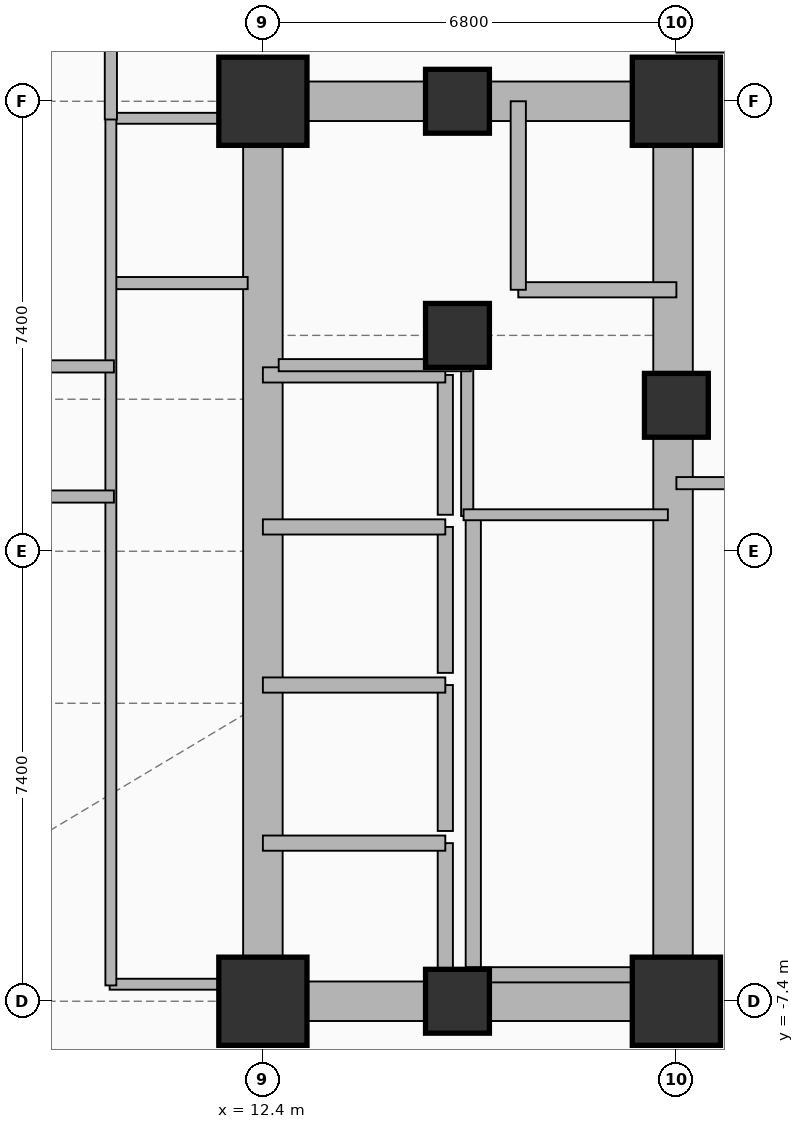
"""IFC4 building model, lengths in metres.
Left out: names, types, materials, properties, quantities, classifications, styles, units other than length and angle.
Written with IfcOpenShell. Run it as: python <this file> out.ifc"""

import sys

from ifc_helpers import new_model, si_unit, direction, frame, frame_2d, origin, origin_2d, place, context, subcontext, project, spatial, rectangle, extrude, element, fill, save


model = new_model("IFC4")
c1 = context("Model", 3, precision=1e-05, world=origin(), true_north=direction((0.0, 1.0)))
c2 = subcontext(c1, "Body", "Model", "MODEL_VIEW")
j1 = project(units=[si_unit("LENGTHUNIT", "METRE"), si_unit("PLANEANGLEUNIT", "RADIAN")], contexts=[c1])
p1 = place(None, origin())
s1 = spatial("IfcSite", under=j1, at=p1, CompositionType="ELEMENT")
p2 = place(p1, origin())
s2 = spatial("IfcBuilding", under=s1, at=p2, CompositionType="ELEMENT")
p3 = place(p2, frame((0.0, 0.0, 80.6)))
s3 = spatial("IfcBuildingStorey", under=s2, at=p3, CompositionType="ELEMENT", Elevation=80.6)
p4 = place(p3, frame((12.4, -7.4, 0.0), z_axis=(0.0, 0.0, 1.0), x_axis=(1.0, 0.0, 0.0)))
e1 = element("IfcColumn", 1, at=p4, inside=s3, PredefinedType="COLUMN", context=c2, shape_type="SweptSolid", body=[
    extrude(rectangle(XDim=1.45, YDim=1.45, at=origin_2d()), origin(), (0.0, 0.0, 1.0), 5.2),
])
p5 = place(p3, frame((15.6, 3.55, 0.0), z_axis=(0.0, 0.0, 1.0), x_axis=(1.0, 0.0, 0.0)))
e2 = element("IfcColumn", 2, at=p5, inside=s3, PredefinedType="COLUMN", context=c2, shape_type="SweptSolid", body=[
    extrude(rectangle(XDim=1.05, YDim=1.05, at=origin_2d()), origin(), (0.0, 0.0, 1.0), 5.2),
])
p6 = place(p3, frame((12.4, 7.4, 0.0), z_axis=(0.0, 0.0, 1.0), x_axis=(1.0, 0.0, 0.0)))
e3 = element("IfcColumn", 3, at=p6, inside=s3, PredefinedType="COLUMN", context=c2, shape_type="SweptSolid", body=[
    extrude(rectangle(XDim=1.45, YDim=1.45, at=origin_2d()), origin(), (0.0, 0.0, 1.0), 5.2),
])
for number, where, z_axis, x_axis in (
    (4, (15.6, -7.4, 0.0), (0.0, 0.0, 1.0), (1.0, 0.0, 0.0)),
    (5, (15.6, 7.4, 0.0), (0.0, 0.0, 1.0), (1.0, 0.0, 0.0)),
):
    element("IfcColumn", number, at=place(p3, frame(where, z_axis=z_axis, x_axis=x_axis)), inside=s3, PredefinedType="COLUMN", context=c2, shape_type="SweptSolid", body=[
        extrude(rectangle(XDim=1.05, YDim=1.05, at=origin_2d()), origin(), (0.0, 0.0, 1.0), 5.2),
    ])
p7 = place(p3, frame((19.2, -7.4, 0.0), z_axis=(0.0, 0.0, 1.0), x_axis=(1.0, 0.0, 0.0)))
e6 = element("IfcColumn", 6, at=p7, inside=s3, PredefinedType="COLUMN", context=c2, shape_type="SweptSolid", body=[
    extrude(rectangle(XDim=1.45, YDim=1.45, at=origin_2d()), origin(), (0.0, 0.0, 1.0), 5.2),
])
p8 = place(p3, frame((19.2, 2.4, 0.0), z_axis=(0.0, 0.0, 1.0), x_axis=(1.0, 0.0, 0.0)))
e7 = element("IfcColumn", 7, at=p8, inside=s3, PredefinedType="COLUMN", context=c2, shape_type="SweptSolid", body=[
    extrude(rectangle(XDim=1.05, YDim=1.05, at=origin_2d()), origin(), (0.0, 0.0, 1.0), 5.2),
])
p9 = place(p3, frame((19.2, 7.4, 0.0), z_axis=(0.0, 0.0, 1.0), x_axis=(1.0, 0.0, 0.0)))
e8 = element("IfcColumn", 8, at=p9, inside=s3, PredefinedType="COLUMN", context=c2, shape_type="SweptSolid", body=[
    extrude(rectangle(XDim=1.45, YDim=1.45, at=origin_2d()), origin(), (0.0, 0.0, 1.0), 5.2),
])
for number, where, z_axis, x_axis in (
    (9, (12.075, -7.4, 0.0), (0.0, 0.0, 1.0), (1.0, 0.0, 0.0)),
    (10, (12.075, 7.4, 0.0), (0.0, 0.0, 1.0), (1.0, 0.0, 0.0)),
):
    element("IfcWall", number, at=place(p3, frame(where, z_axis=z_axis, x_axis=x_axis)), inside=s3, PredefinedType="SHEAR", context=c2, shape_type="SweptSolid", body=[
        extrude(rectangle(XDim=7.45, YDim=0.65, at=frame_2d((3.725, 0.0))), origin(), (0.0, 0.0, 1.0), 4.8),
    ])
p10 = place(p3, frame((12.4, -7.4, 0.0), z_axis=(0.0, 0.0, 1.0), x_axis=(0.0, 1.0, 0.0)))
e11 = element("IfcWall", 11, at=p10, inside=s3, PredefinedType="SHEAR", context=c2, shape_type="SweptSolid", body=[
    extrude(rectangle(XDim=14.8, YDim=0.65, at=frame_2d((7.4, 0.0))), origin(), (0.0, 0.0, 1.0), 4.8),
])
p11 = place(p10, frame((0.85, 0.0, 0.0)))
e12 = element("IfcOpeningElement", 12, at=p11, cuts=e11, PredefinedType="OPENING", context=c2, shape_type="SweptSolid", body=[
    extrude(rectangle(XDim=1.1, YDim=2.05, at=frame_2d((0.55, 1.025))), frame((0.0, 0.335, 0.0), z_axis=(0.0, -1.0, 0.0), x_axis=(1.0, 0.0, 0.0)), (0.0, 0.0, 1.0), 0.67),
])
p12 = place(p10, frame((10.53, 0.0, 0.0)))
e13 = element("IfcOpeningElement", 13, at=p12, cuts=e11, PredefinedType="OPENING", context=c2, shape_type="SweptSolid", body=[
    extrude(rectangle(XDim=1.1, YDim=2.05, at=frame_2d((0.55, 1.025))), frame((0.0, 0.335, 0.0), z_axis=(0.0, -1.0, 0.0), x_axis=(1.0, 0.0, 0.0)), (0.0, 0.0, 1.0), 0.67),
])
p13 = place(p3, frame((19.145, -7.4, 0.0), z_axis=(0.0, 0.0, 1.0), x_axis=(0.0, 1.0, 0.0)))
e14 = element("IfcWall", 14, at=p13, inside=s3, PredefinedType="SHEAR", context=c2, shape_type="SweptSolid", body=[
    extrude(rectangle(XDim=14.8, YDim=0.65, at=frame_2d((7.4, 0.0))), origin(), (0.0, 0.0, 1.0), 4.8),
])
p14 = place(p13, frame((10.6, 0.0, 0.0)))
e15 = element("IfcOpeningElement", 15, at=p14, cuts=e14, PredefinedType="OPENING", context=c2, shape_type="SweptSolid", body=[
    extrude(rectangle(XDim=0.9, YDim=2.05, at=frame_2d((0.45, 1.025))), frame((0.0, 0.335, 0.0), z_axis=(0.0, -1.0, 0.0), x_axis=(1.0, 0.0, 0.0)), (0.0, 0.0, 1.0), 0.67),
])
p15 = place(p3, frame((15.86, -7.085, 0.0), z_axis=(0.0, 0.0, 1.0), x_axis=(0.0, 1.0, 0.0)))
e16 = element("IfcWall", 16, at=p15, inside=s3, PredefinedType="SOLIDWALL", context=c2, shape_type="SweptSolid", body=[
    extrude(rectangle(XDim=7.685, YDim=0.25, at=frame_2d((3.843, 0.0))), origin(), (0.0, 0.0, 1.0), 4.8),
])
p16 = place(p3, frame((15.74, -6.965, 0.0), z_axis=(0.0, 0.0, 1.0), x_axis=(1.0, 0.0, 0.0)))
e17 = element("IfcWall", 17, at=p16, inside=s3, PredefinedType="SOLIDWALL", context=c2, shape_type="SweptSolid", body=[
    extrude(rectangle(XDim=3.46, YDim=0.25, at=frame_2d((1.73, 0.0))), origin(), (0.0, 0.0, 1.0), 4.8),
])
p17 = place(p3, frame((16.6, 4.3, 0.0), z_axis=(0.0, 0.0, 1.0), x_axis=(1.0, 0.0, 0.0)))
e18 = element("IfcWall", 18, at=p17, inside=s3, PredefinedType="SOLIDWALL", context=c2, shape_type="SweptSolid", body=[
    extrude(rectangle(XDim=2.6, YDim=0.25, at=frame_2d((1.3, 0.0))), origin(), (0.0, 0.0, 1.0), 4.8),
])
p18 = place(p3, frame((16.6, 7.4, 0.0), z_axis=(0.0, 0.0, 1.0), x_axis=(0.0, -1.0, 0.0)))
e19 = element("IfcWall", 19, at=p18, inside=s3, PredefinedType="SOLIDWALL", context=c2, shape_type="SweptSolid", body=[
    extrude(rectangle(XDim=3.1, YDim=0.25, at=frame_2d((1.55, 0.0))), origin(), (0.0, 0.0, 1.0), 4.8),
])
p19 = place(p18, frame((0.95, 0.0, 0.0)))
e20 = element("IfcOpeningElement", 20, at=p19, cuts=e19, PredefinedType="OPENING", context=c2, shape_type="SweptSolid", body=[
    extrude(rectangle(XDim=1.2, YDim=2.05, at=frame_2d((0.6, 1.025))), frame((0.0, 0.135, 0.0), z_axis=(0.0, -1.0, 0.0), x_axis=(1.0, 0.0, 0.0)), (0.0, 0.0, 1.0), 0.27),
])
p20 = place(p3, frame((15.4, -7.4, 0.0), z_axis=(0.0, 0.0, 1.0), x_axis=(0.0, 1.0, 0.0)))
e21 = element("IfcWall", 21, at=p20, inside=s3, PredefinedType="SOLIDWALL", context=c2, shape_type="SweptSolid", body=[
    extrude(rectangle(XDim=2.6, YDim=0.25, at=frame_2d((1.3, 0.0))), origin(), (0.0, 0.0, 1.0), 4.8),
])
p21 = place(p3, frame((15.4, -4.8, 0.0), z_axis=(0.0, 0.0, 1.0), x_axis=(-1.0, 0.0, 0.0)))
e22 = element("IfcWall", 22, at=p21, inside=s3, PredefinedType="SOLIDWALL", context=c2, shape_type="SweptSolid", body=[
    extrude(rectangle(XDim=3.0, YDim=0.25, at=frame_2d((1.5, 0.0))), origin(), (0.0, 0.0, 1.0), 4.8),
])
p22 = place(p3, frame((15.4, -4.6, 0.0), z_axis=(0.0, 0.0, 1.0), x_axis=(0.0, 1.0, 0.0)))
e23 = element("IfcWall", 23, at=p22, inside=s3, PredefinedType="SOLIDWALL", context=c2, shape_type="SweptSolid", body=[
    extrude(rectangle(XDim=2.4, YDim=0.25, at=frame_2d((1.2, 0.0))), origin(), (0.0, 0.0, 1.0), 4.8),
])
p23 = place(p3, frame((15.4, -2.2, 0.0), z_axis=(0.0, 0.0, 1.0), x_axis=(-1.0, 0.0, 0.0)))
e24 = element("IfcWall", 24, at=p23, inside=s3, PredefinedType="SOLIDWALL", context=c2, shape_type="SweptSolid", body=[
    extrude(rectangle(XDim=3.0, YDim=0.25, at=frame_2d((1.5, 0.0))), origin(), (0.0, 0.0, 1.0), 4.8),
])
p24 = place(p3, frame((15.4, -2.0, 0.0), z_axis=(0.0, 0.0, 1.0), x_axis=(0.0, 1.0, 0.0)))
e25 = element("IfcWall", 25, at=p24, inside=s3, PredefinedType="SOLIDWALL", context=c2, shape_type="SweptSolid", body=[
    extrude(rectangle(XDim=2.4, YDim=0.25, at=frame_2d((1.2, 0.0))), origin(), (0.0, 0.0, 1.0), 4.8),
])
p25 = place(p3, frame((15.4, 0.4, 0.0), z_axis=(0.0, 0.0, 1.0), x_axis=(-1.0, 0.0, 0.0)))
e26 = element("IfcWall", 26, at=p25, inside=s3, PredefinedType="SOLIDWALL", context=c2, shape_type="SweptSolid", body=[
    extrude(rectangle(XDim=3.0, YDim=0.25, at=frame_2d((1.5, 0.0))), origin(), (0.0, 0.0, 1.0), 4.8),
])
p26 = place(p3, frame((15.4, 0.6, 0.0), z_axis=(0.0, 0.0, 1.0), x_axis=(0.0, 1.0, 0.0)))
e27 = element("IfcWall", 27, at=p26, inside=s3, PredefinedType="SOLIDWALL", context=c2, shape_type="SweptSolid", body=[
    extrude(rectangle(XDim=2.3, YDim=0.25, at=frame_2d((1.15, 0.0))), origin(), (0.0, 0.0, 1.0), 4.8),
])
p27 = place(p3, frame((15.4, 2.9, 0.0), z_axis=(0.0, 0.0, 1.0), x_axis=(-1.0, 0.0, 0.0)))
e28 = element("IfcWall", 28, at=p27, inside=s3, PredefinedType="SOLIDWALL", context=c2, shape_type="SweptSolid", body=[
    extrude(rectangle(XDim=3.0, YDim=0.25, at=frame_2d((1.5, 0.0))), origin(), (0.0, 0.0, 1.0), 4.8),
])
p28 = place(p3, frame((15.76, 0.58, 0.0), z_axis=(0.0, 0.0, 1.0), x_axis=(0.0, 1.0, 0.0)))
e29 = element("IfcWall", 29, at=p28, inside=s3, PredefinedType="PARTITIONING", context=c2, shape_type="SweptSolid", body=[
    extrude(rectangle(XDim=2.52, YDim=0.2, at=frame_2d((1.26, 0.0))), origin(), (0.0, 0.0, 1.0), 4.8),
])
p29 = place(p3, frame((12.66, 3.06, 0.0), z_axis=(0.0, 0.0, 1.0), x_axis=(1.0, 0.0, 0.0)))
e30 = element("IfcWall", 30, at=p29, inside=s3, PredefinedType="PARTITIONING", context=c2, shape_type="SweptSolid", body=[
    extrude(rectangle(XDim=3.16, YDim=0.2, at=frame_2d((1.58, 0.0))), origin(), (0.0, 0.0, 1.0), 4.8),
])
p30 = place(p3, frame((15.7, 0.6, 0.0), z_axis=(0.0, 0.0, 1.0), x_axis=(1.0, 0.0, 0.0)))
e31 = element("IfcWall", 31, at=p30, inside=s3, PredefinedType="PARTITIONING", context=c2, shape_type="SweptSolid", body=[
    extrude(rectangle(XDim=3.36, YDim=0.18, at=frame_2d((1.68, 0.0))), origin(), (0.0, 0.0, 1.0), 4.8),
])
p31 = place(p30, frame((1.155, 0.0, 0.0)))
e32 = element("IfcOpeningElement", 32, at=p31, cuts=e31, PredefinedType="OPENING", context=c2, shape_type="SweptSolid", body=[
    extrude(rectangle(XDim=1.05, YDim=2.05, at=frame_2d((0.525, 1.025))), frame((0.0, 0.1, 0.0), z_axis=(0.0, -1.0, 0.0), x_axis=(1.0, 0.0, 0.0)), (0.0, 0.0, 1.0), 0.2),
])
p32 = place(p3, frame((9.88, 4.41, 0.0), z_axis=(0.0, 0.0, 1.0), x_axis=(1.0, 0.0, 0.0)))
e33 = element("IfcWall", 33, at=p32, inside=s3, PredefinedType="PARTITIONING", context=c2, shape_type="SweptSolid", body=[
    extrude(rectangle(XDim=2.27, YDim=0.2, at=frame_2d((1.135, 0.0))), origin(), (0.0, 0.0, 1.0), 4.8),
])
p33 = place(p32, frame((0.685, 0.0, 0.0)))
e34 = element("IfcOpeningElement", 34, at=p33, cuts=e33, PredefinedType="OPENING", context=c2, shape_type="SweptSolid", body=[
    extrude(rectangle(XDim=0.9, YDim=2.05, at=frame_2d((0.45, 1.025))), frame((0.0, 0.11, 0.0), z_axis=(0.0, -1.0, 0.0), x_axis=(1.0, 0.0, 0.0)), (0.0, 0.0, 1.0), 0.22),
])
for number, where, z_axis, x_axis in (
    (35, (9.88, 7.12, 0.0), (0.0, 0.0, 1.0), (1.0, 0.0, 0.0)),
    (36, (9.88, -7.12, 0.0), (0.0, 0.0, 1.0), (1.0, 0.0, 0.0)),
):
    element("IfcWall", number, at=place(p3, frame(where, z_axis=z_axis, x_axis=x_axis)), inside=s3, PredefinedType="PARTITIONING", context=c2, shape_type="SweptSolid", body=[
        extrude(rectangle(XDim=2.27, YDim=0.18, at=frame_2d((1.135, 0.0))), origin(), (0.0, 0.0, 1.0), 3.84),
    ])
p34 = place(p3, frame((9.9, -7.14, 0.0), z_axis=(0.0, 0.0, 1.0), x_axis=(0.0, 1.0, 0.0)))
e37 = element("IfcWall", 37, at=p34, inside=s3, PredefinedType="PARTITIONING", context=c2, shape_type="SweptSolid", body=[
    extrude(rectangle(XDim=14.28, YDim=0.18, at=frame_2d((7.14, 0.0))), origin(), (0.0, 0.0, 1.0), 4.8),
])
p35 = place(p34, frame((8.689, 0.0, 0.0)))
e38 = element("IfcOpeningElement", 38, at=p35, cuts=e37, PredefinedType="OPENING", context=c2, shape_type="SweptSolid", body=[
    extrude(rectangle(XDim=0.9, YDim=2.05, at=frame_2d((0.45, 1.025))), frame((0.0, 0.1, 0.0), z_axis=(0.0, -1.0, 0.0), x_axis=(1.0, 0.0, 0.0)), (0.0, 0.0, 1.0), 0.2),
])
p36 = place(p3, frame((-9.95, 3.04, 0.0), z_axis=(0.0, 0.0, 1.0), x_axis=(1.0, 0.0, 0.0)))
e39 = element("IfcWall", 39, at=p36, inside=s3, PredefinedType="PARTITIONING", context=c2, shape_type="SweptSolid", body=[
    extrude(rectangle(XDim=19.9, YDim=0.2, at=frame_2d((9.95, 0.0))), origin(), (0.0, 0.0, 1.0), 4.8),
])
p37 = place(p36, frame((9.425, 0.0, 0.0)))
e40 = element("IfcOpeningElement", 40, at=p37, cuts=e39, PredefinedType="OPENING", context=c2, shape_type="SweptSolid", body=[
    extrude(rectangle(XDim=1.05, YDim=2.05, at=frame_2d((0.525, 1.025))), frame((0.0, 0.11, 0.0), z_axis=(0.0, -1.0, 0.0), x_axis=(1.0, 0.0, 0.0)), (0.0, 0.0, 1.0), 0.22),
])
p38 = place(p3, frame((-9.95, 0.9, 0.0), z_axis=(0.0, 0.0, 1.0), x_axis=(1.0, 0.0, 0.0)))
e41 = element("IfcWall", 41, at=p38, inside=s3, PredefinedType="PARTITIONING", context=c2, shape_type="SweptSolid", body=[
    extrude(rectangle(XDim=19.9, YDim=0.2, at=frame_2d((9.95, 0.0))), origin(), (0.0, 0.0, 1.0), 4.8),
])
p39 = place(p38, frame((9.425, 0.0, 0.0)))
e42 = element("IfcOpeningElement", 42, at=p39, cuts=e41, PredefinedType="OPENING", context=c2, shape_type="SweptSolid", body=[
    extrude(rectangle(XDim=1.05, YDim=2.05, at=frame_2d((0.525, 1.025))), frame((0.0, 0.11, 0.0), z_axis=(0.0, -1.0, 0.0), x_axis=(1.0, 0.0, 0.0)), (0.0, 0.0, 1.0), 0.22),
])
p40 = place(p3, frame((19.2, 1.12, 0.0), z_axis=(0.0, 0.0, 1.0), x_axis=(1.0, 0.0, 0.0)))
e43 = element("IfcWall", 43, at=p40, inside=s3, PredefinedType="PARTITIONING", context=c2, shape_type="SweptSolid", body=[
    extrude(rectangle(XDim=7.01, YDim=0.2, at=frame_2d((3.505, 0.0))), origin(), (0.0, 0.0, 1.0), 4.8),
])
p41 = place(p3, frame((9.9, 7.1, 0.0), z_axis=(0.0, 0.0, 1.0), x_axis=(0.0, 1.0, 0.0)))
e44 = element("IfcWall", 44, at=p41, inside=s3, PredefinedType="PARTITIONING", context=c2, shape_type="SweptSolid", body=[
    extrude(rectangle(XDim=15.11, YDim=0.2, at=frame_2d((7.555, 0.0))), origin(), (0.0, 0.0, 1.0), 4.8),
])
p42 = place(p41, frame((8.239, 0.0, 0.0)))
e45 = element("IfcOpeningElement", 45, at=p42, cuts=e44, PredefinedType="OPENING", context=c2, shape_type="SweptSolid", body=[
    extrude(rectangle(XDim=1.05, YDim=2.05, at=frame_2d((0.525, 1.025))), frame((0.0, 0.11, 0.0), z_axis=(0.0, -1.0, 0.0), x_axis=(1.0, 0.0, 0.0)), (0.0, 0.0, 1.0), 0.22),
])
p43 = place(p19, origin())
e46 = element("IfcDoor", 46, at=p43, inside=s3, OperationType="SLIDING_TO_LEFT", PredefinedType="DOOR", context=c2, shape_type="SweptSolid", body=[
    extrude(rectangle(XDim=1.2, YDim=2.05, at=frame_2d((0.6, 1.025))), frame((0.0, 0.025, 0.0), z_axis=(0.0, -1.0, 0.0), x_axis=(1.0, 0.0, 0.0)), (0.0, 0.0, 1.0), 0.05),
])
fill(e20, e46)
p44 = place(p11, origin())
e47 = element("IfcDoor", 47, at=p44, inside=s3, OperationType="SLIDING_TO_LEFT", PredefinedType="DOOR", context=c2, shape_type="SweptSolid", body=[
    extrude(rectangle(XDim=1.1, YDim=2.05, at=frame_2d((0.55, 1.025))), frame((0.0, 0.025, 0.0), z_axis=(0.0, -1.0, 0.0), x_axis=(1.0, 0.0, 0.0)), (0.0, 0.0, 1.0), 0.05),
])
fill(e12, e47)
p45 = place(p31, origin())
e48 = element("IfcDoor", 48, at=p45, inside=s3, OperationType="SINGLE_SWING_RIGHT", PredefinedType="DOOR", context=c2, shape_type="SweptSolid", body=[
    extrude(rectangle(XDim=1.05, YDim=2.05, at=frame_2d((0.525, 1.025))), frame((0.0, 0.025, 0.0), z_axis=(0.0, -1.0, 0.0), x_axis=(1.0, 0.0, 0.0)), (0.0, 0.0, 1.0), 0.05),
])
fill(e32, e48)
p46 = place(p33, origin())
e49 = element("IfcDoor", 49, at=p46, inside=s3, OperationType="SINGLE_SWING_RIGHT", PredefinedType="DOOR", context=c2, shape_type="SweptSolid", body=[
    extrude(rectangle(XDim=0.9, YDim=2.05, at=frame_2d((0.45, 1.025))), frame((0.0, 0.025, 0.0), z_axis=(0.0, -1.0, 0.0), x_axis=(1.0, 0.0, 0.0)), (0.0, 0.0, 1.0), 0.05),
])
fill(e34, e49)
p47 = place(p35, origin())
e50 = element("IfcDoor", 50, at=p47, inside=s3, OperationType="SINGLE_SWING_RIGHT", PredefinedType="DOOR", context=c2, shape_type="SweptSolid", body=[
    extrude(rectangle(XDim=0.9, YDim=2.05, at=frame_2d((0.45, 1.025))), frame((0.0, 0.025, 0.0), z_axis=(0.0, -1.0, 0.0), x_axis=(1.0, 0.0, 0.0)), (0.0, 0.0, 1.0), 0.05),
])
fill(e38, e50)
p48 = place(p12, origin())
e51 = element("IfcDoor", 51, at=p48, inside=s3, OperationType="SINGLE_SWING_RIGHT", PredefinedType="DOOR", context=c2, shape_type="SweptSolid", body=[
    extrude(rectangle(XDim=1.1, YDim=2.05, at=frame_2d((0.55, 1.025))), frame((0.0, 0.025, 0.0), z_axis=(0.0, -1.0, 0.0), x_axis=(1.0, 0.0, 0.0)), (0.0, 0.0, 1.0), 0.05),
])
fill(e13, e51)
p49 = place(p14, origin())
e52 = element("IfcDoor", 52, at=p49, inside=s3, OperationType="SINGLE_SWING_LEFT", PredefinedType="DOOR", context=c2, shape_type="SweptSolid", body=[
    extrude(rectangle(XDim=0.9, YDim=2.05, at=frame_2d((0.45, 1.025))), frame((0.0, 0.025, 0.0), z_axis=(0.0, -1.0, 0.0), x_axis=(1.0, 0.0, 0.0)), (0.0, 0.0, 1.0), 0.05),
])
fill(e15, e52)
save(model, sys.argv[1])
